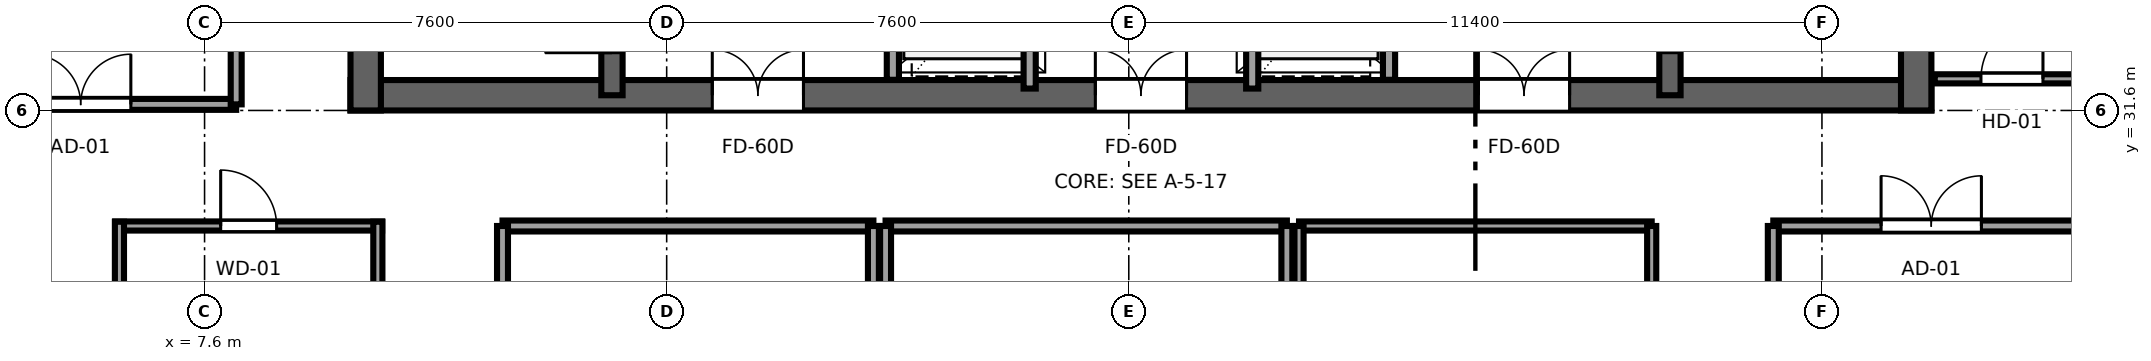
"""IFC4 building model, lengths in metres.
Left out: names, types, materials, properties, quantities, classifications, styles, units other than length and angle.
Written with IfcOpenShell. Run it as: python <this file> out.ifc"""

import sys

from ifc_helpers import new_model, si_unit, direction, frame, frame_2d, origin, place, context, subcontext, project, spatial, rectangle, extrude, source, transform, mapped, element, fill, save


model = new_model("IFC4")
c1 = context("Model", 3, precision=1e-05, world=origin(), true_north=direction((0.0, 1.0)))
c2 = subcontext(c1, "Body", "Model", "MODEL_VIEW")
j1 = project(units=[si_unit("LENGTHUNIT", "METRE"), si_unit("PLANEANGLEUNIT", "RADIAN")], contexts=[c1])
p1 = place(None, origin())
s1 = spatial("IfcSite", under=j1, at=p1, CompositionType="ELEMENT")
p2 = place(p1, origin())
s2 = spatial("IfcBuilding", under=s1, at=p2, CompositionType="ELEMENT")
p3 = place(p2, frame((0.0, 0.0, 252.3)))
s3 = spatial("IfcBuildingStorey", under=s2, at=p3, CompositionType="ELEMENT", Elevation=252.3)
p4 = place(p3, frame((10.0, 31.85, 0.0), z_axis=(0.0, 0.0, 1.0), x_axis=(1.0, 0.0, 0.0)))
e1 = element("IfcWall", 1, at=p4, inside=s3, PredefinedType="SHEAR", context=c2, shape_type="SweptSolid", body=[
    extrude(rectangle(XDim=26.0, YDim=0.5, at=frame_2d((13.0, 0.0))), origin(), (0.0, 0.0, 1.0), 3.55),
])
p5 = place(p4, frame((7.45, 0.0, 0.0), z_axis=(0.0, 0.0, 1.0), x_axis=(-1.0, 0.0, 0.0)))
e2 = element("IfcOpeningElement", 2, at=p5, cuts=e1, PredefinedType="OPENING", context=c2, shape_type="SweptSolid", body=[
    extrude(rectangle(XDim=1.5, YDim=2.04, at=frame_2d((0.75, 1.02))), frame((0.0, 0.26, 0.0), z_axis=(0.0, -1.0, 0.0), x_axis=(1.0, 0.0, 0.0)), (0.0, 0.0, 1.0), 0.52),
])
p6 = place(p4, frame((13.75, 0.0, 0.0), z_axis=(0.0, 0.0, 1.0), x_axis=(-1.0, 0.0, 0.0)))
e3 = element("IfcOpeningElement", 3, at=p6, cuts=e1, PredefinedType="OPENING", context=c2, shape_type="SweptSolid", body=[
    extrude(rectangle(XDim=1.5, YDim=2.04, at=frame_2d((0.75, 1.02))), frame((0.0, 0.26, 0.0), z_axis=(0.0, -1.0, 0.0), x_axis=(1.0, 0.0, 0.0)), (0.0, 0.0, 1.0), 0.52),
])
p7 = place(p4, frame((20.05, 0.0, 0.0), z_axis=(0.0, 0.0, 1.0), x_axis=(-1.0, 0.0, 0.0)))
e4 = element("IfcOpeningElement", 4, at=p7, cuts=e1, PredefinedType="OPENING", context=c2, shape_type="SweptSolid", body=[
    extrude(rectangle(XDim=1.5, YDim=2.04, at=frame_2d((0.75, 1.02))), frame((0.0, 0.26, 0.0), z_axis=(0.0, -1.0, 0.0), x_axis=(1.0, 0.0, 0.0)), (0.0, 0.0, 1.0), 0.52),
])
for number, where, z_axis, x_axis in (
    (5, (10.25, 31.6, 0.0), (0.0, 0.0, 1.0), (0.0, 1.0, 0.0)),
    (6, (35.75, 31.6, 0.0), (0.0, 0.0, 1.0), (0.0, 1.0, 0.0)),
):
    element("IfcWall", number, at=place(p3, frame(where, z_axis=z_axis, x_axis=x_axis)), inside=s3, PredefinedType="SHEAR", context=c2, shape_type="SweptSolid", body=[
        extrude(rectangle(XDim=13.6, YDim=0.5, at=frame_2d((6.8, 0.0))), origin(), (0.0, 0.0, 1.0), 3.55),
    ])
p8 = place(p3, frame((14.3, 31.85, 0.0), z_axis=(0.0, 0.0, 1.0), x_axis=(0.0, 1.0, 0.0)))
e7 = element("IfcWall", 7, at=p8, inside=s3, PredefinedType="SHEAR", context=c2, shape_type="SweptSolid", body=[
    extrude(rectangle(XDim=13.1, YDim=0.35, at=frame_2d((6.55, 0.0))), origin(), (0.0, 0.0, 1.0), 3.55),
])
p9 = place(p8, frame((0.7, 0.0, 0.0)))
e8 = element("IfcOpeningElement", 8, at=p9, cuts=e7, PredefinedType="OPENING", context=c2, shape_type="SweptSolid", body=[
    extrude(rectangle(XDim=1.1, YDim=2.12, at=frame_2d((0.55, 1.06))), frame((0.0, 0.185, 0.0), z_axis=(0.0, -1.0, 0.0), x_axis=(1.0, 0.0, 0.0)), (0.0, 0.0, 1.0), 0.37),
])
p10 = place(p3, frame((31.7, 31.85, 0.0), z_axis=(0.0, 0.0, 1.0), x_axis=(0.0, 1.0, 0.0)))
e9 = element("IfcWall", 9, at=p10, inside=s3, PredefinedType="SHEAR", context=c2, shape_type="SweptSolid", body=[
    extrude(rectangle(XDim=13.1, YDim=0.35, at=frame_2d((6.55, 0.0))), origin(), (0.0, 0.0, 1.0), 3.55),
])
p11 = place(p10, frame((1.8, 0.0, 0.0), z_axis=(0.0, 0.0, 1.0), x_axis=(-1.0, 0.0, 0.0)))
e10 = element("IfcOpeningElement", 10, at=p11, cuts=e9, PredefinedType="OPENING", context=c2, shape_type="SweptSolid", body=[
    extrude(rectangle(XDim=1.1, YDim=2.12, at=frame_2d((0.55, 1.06))), frame((0.0, 0.185, 0.0), z_axis=(0.0, -1.0, 0.0), x_axis=(1.0, 0.0, 0.0)), (0.0, 0.0, 1.0), 0.37),
])
for number, where, z_axis, x_axis in (
    (11, (18.92, 32.104, 0.0), (0.0, 0.0, 1.0), (0.0, 1.0, 0.0)),
    (12, (27.08, 32.104, 0.0), (0.0, 0.0, 1.0), (0.0, 1.0, 0.0)),
):
    element("IfcWall", number, at=place(p3, frame(where, z_axis=z_axis, x_axis=x_axis)), inside=s3, PredefinedType="SOLIDWALL", context=c2, shape_type="SweptSolid", body=[
        extrude(rectangle(XDim=4.046, YDim=0.2, at=frame_2d((2.023, 0.0))), origin(), (0.0, 0.0, 1.0), 3.37),
    ])
p12 = place(p3, frame((21.17, 31.96, 0.0), z_axis=(0.0, 0.0, 1.0), x_axis=(0.0, 1.0, 0.0)))
e13 = element("IfcWall", 13, at=p12, inside=s3, PredefinedType="SOLIDWALL", context=c2, shape_type="SweptSolid", body=[
    extrude(rectangle(XDim=5.08, YDim=0.2, at=frame_2d((2.54, 0.0))), origin(), (0.0, 0.0, 1.0), 3.37),
])
p13 = place(p12, frame((0.74, 0.0, 0.0)))
e14 = element("IfcOpeningElement", 14, at=p13, cuts=e13, PredefinedType="OPENING", context=c2, shape_type="SweptSolid", body=[
    extrude(rectangle(XDim=1.1, YDim=2.12, at=frame_2d((0.55, 1.06))), frame((0.0, 0.11, 0.0), z_axis=(0.0, -1.0, 0.0), x_axis=(1.0, 0.0, 0.0)), (0.0, 0.0, 1.0), 0.22),
])
p14 = place(p12, frame((3.24, 0.0, 0.0)))
e15 = element("IfcOpeningElement", 15, at=p14, cuts=e13, PredefinedType="OPENING", context=c2, shape_type="SweptSolid", body=[
    extrude(rectangle(XDim=1.1, YDim=2.12, at=frame_2d((0.55, 1.06))), frame((0.0, 0.11, 0.0), z_axis=(0.0, -1.0, 0.0), x_axis=(1.0, 0.0, 0.0)), (0.0, 0.0, 1.0), 0.22),
])
p15 = place(p3, frame((24.83, 31.96, 0.0), z_axis=(0.0, 0.0, 1.0), x_axis=(0.0, 1.0, 0.0)))
e16 = element("IfcWall", 16, at=p15, inside=s3, PredefinedType="SOLIDWALL", context=c2, shape_type="SweptSolid", body=[
    extrude(rectangle(XDim=5.08, YDim=0.2, at=frame_2d((2.54, 0.0))), origin(), (0.0, 0.0, 1.0), 3.37),
])
p16 = place(p15, frame((0.74, 0.0, 0.0)))
e17 = element("IfcOpeningElement", 17, at=p16, cuts=e16, PredefinedType="OPENING", context=c2, shape_type="SweptSolid", body=[
    extrude(rectangle(XDim=1.1, YDim=2.12, at=frame_2d((0.55, 1.06))), frame((0.0, 0.11, 0.0), z_axis=(0.0, -1.0, 0.0), x_axis=(1.0, 0.0, 0.0)), (0.0, 0.0, 1.0), 0.22),
])
p17 = place(p15, frame((3.24, 0.0, 0.0)))
e18 = element("IfcOpeningElement", 18, at=p17, cuts=e16, PredefinedType="OPENING", context=c2, shape_type="SweptSolid", body=[
    extrude(rectangle(XDim=1.1, YDim=2.12, at=frame_2d((0.55, 1.06))), frame((0.0, 0.11, 0.0), z_axis=(0.0, -1.0, 0.0), x_axis=(1.0, 0.0, 0.0)), (0.0, 0.0, 1.0), 0.22),
])
p18 = place(p3, frame((12.5, 29.7, 0.0), z_axis=(0.0, 0.0, 1.0), x_axis=(1.0, 0.0, 0.0)))
e19 = element("IfcWall", 19, at=p18, inside=s3, PredefinedType="PARTITIONING", context=c2, shape_type="SweptSolid", body=[
    extrude(rectangle(XDim=6.1, YDim=0.18, at=frame_2d((3.05, 0.0))), origin(), (0.0, 0.0, 1.0), 3.37),
])
for number, where, z_axis, x_axis in (
    (20, (12.5, 22.5, 0.0), (0.0, 0.0, 1.0), (0.0, 1.0, 0.0)),
    (21, (18.6, 22.5, 0.0), (0.0, 0.0, 1.0), (0.0, 1.0, 0.0)),
):
    element("IfcWall", number, at=place(p3, frame(where, z_axis=z_axis, x_axis=x_axis)), inside=s3, PredefinedType="PARTITIONING", context=c2, shape_type="SweptSolid", body=[
        extrude(rectangle(XDim=7.2, YDim=0.18, at=frame_2d((3.6, 0.0))), origin(), (0.0, 0.0, 1.0), 3.37),
    ])
p19 = place(p3, frame((18.8, 29.7, 0.0), z_axis=(0.0, 0.0, 1.0), x_axis=(1.0, 0.0, 0.0)))
e22 = element("IfcWall", 22, at=p19, inside=s3, PredefinedType="PARTITIONING", context=c2, shape_type="SweptSolid", body=[
    extrude(rectangle(XDim=6.6, YDim=0.18, at=frame_2d((3.3, 0.0))), origin(), (0.0, 0.0, 1.0), 3.37),
])
for number, where, z_axis, x_axis in (
    (23, (18.8, 22.5, 0.0), (0.0, 0.0, 1.0), (0.0, 1.0, 0.0)),
    (24, (25.4, 22.5, 0.0), (0.0, 0.0, 1.0), (0.0, 1.0, 0.0)),
):
    element("IfcWall", number, at=place(p3, frame(where, z_axis=z_axis, x_axis=x_axis)), inside=s3, PredefinedType="PARTITIONING", context=c2, shape_type="SweptSolid", body=[
        extrude(rectangle(XDim=7.2, YDim=0.18, at=frame_2d((3.6, 0.0))), origin(), (0.0, 0.0, 1.0), 3.37),
    ])
p20 = place(p3, frame((25.6, 29.7, 0.0), z_axis=(0.0, 0.0, 1.0), x_axis=(1.0, 0.0, 0.0)))
e25 = element("IfcWall", 25, at=p20, inside=s3, PredefinedType="PARTITIONING", context=c2, shape_type="SweptSolid", body=[
    extrude(rectangle(XDim=5.8, YDim=0.15, at=frame_2d((2.9, 0.0))), origin(), (0.0, 0.0, 1.0), 3.37),
])
for number, where, z_axis, x_axis in (
    (26, (25.6, 22.5, 0.0), (0.0, 0.0, 1.0), (0.0, 1.0, 0.0)),
    (27, (31.4, 22.5, 0.0), (0.0, 0.0, 1.0), (0.0, 1.0, 0.0)),
):
    element("IfcWall", number, at=place(p3, frame(where, z_axis=z_axis, x_axis=x_axis)), inside=s3, PredefinedType="PARTITIONING", context=c2, shape_type="SweptSolid", body=[
        extrude(rectangle(XDim=7.2, YDim=0.15, at=frame_2d((3.6, 0.0))), origin(), (0.0, 0.0, 1.0), 3.37),
    ])
p21 = place(p3, frame((6.13, 29.7, 0.0), z_axis=(0.0, 0.0, 1.0), x_axis=(1.0, 0.0, 0.0)))
e28 = element("IfcWall", 28, at=p21, inside=s3, PredefinedType="PARTITIONING", context=c2, shape_type="SweptSolid", body=[
    extrude(rectangle(XDim=4.39, YDim=0.15, at=frame_2d((2.195, 0.0))), origin(), (0.0, 0.0, 1.0), 3.37),
])
p22 = place(p21, frame((1.735, 0.0, 0.0)))
e29 = element("IfcOpeningElement", 29, at=p22, cuts=e28, PredefinedType="OPENING", context=c2, shape_type="SweptSolid", body=[
    extrude(rectangle(XDim=0.92, YDim=2.01, at=frame_2d((0.46, 1.005))), frame((0.0, 0.085, 0.0), z_axis=(0.0, -1.0, 0.0), x_axis=(1.0, 0.0, 0.0)), (0.0, 0.0, 1.0), 0.17),
])
for number, where, z_axis, x_axis in (
    (30, (6.2, 26.43, 0.0), (0.0, 0.0, 1.0), (0.0, 1.0, 0.0)),
    (31, (10.45, 26.43, 0.0), (0.0, 0.0, 1.0), (0.0, 1.0, 0.0)),
):
    element("IfcWall", number, at=place(p3, frame(where, z_axis=z_axis, x_axis=x_axis)), inside=s3, PredefinedType="PARTITIONING", context=c2, shape_type="SweptSolid", body=[
        extrude(rectangle(XDim=3.34, YDim=0.15, at=frame_2d((1.67, 0.0))), origin(), (0.0, 0.0, 1.0), 3.37),
    ])
p23 = place(p3, frame((3.005, 31.7, 0.0), z_axis=(0.0, 0.0, 1.0), x_axis=(1.0, 0.0, 0.0)))
e32 = element("IfcWall", 32, at=p23, inside=s3, PredefinedType="PARTITIONING", context=c2, shape_type="SweptSolid", body=[
    extrude(rectangle(XDim=5.115, YDim=0.18, at=frame_2d((2.558, 0.0))), origin(), (0.0, 0.0, 1.0), 3.37),
])
p24 = place(p23, frame((1.732, 0.0, 0.0)))
e33 = element("IfcOpeningElement", 33, at=p24, cuts=e32, PredefinedType="OPENING", context=c2, shape_type="SweptSolid", body=[
    extrude(rectangle(XDim=1.65, YDim=2.15, at=frame_2d((0.825, 1.075))), frame((0.0, 0.1, 0.0), z_axis=(0.0, -1.0, 0.0), x_axis=(1.0, 0.0, 0.0)), (0.0, 0.0, 1.0), 0.2),
])
p25 = place(p3, frame((8.12, 31.7, 0.0), z_axis=(0.0, 0.0, 1.0), x_axis=(0.0, 1.0, 0.0)))
e34 = element("IfcWall", 34, at=p25, inside=s3, PredefinedType="PARTITIONING", context=c2, shape_type="SweptSolid", body=[
    extrude(rectangle(XDim=6.1, YDim=0.18, at=frame_2d((3.05, 0.0))), origin(), (0.0, 0.0, 1.0), 3.37),
])
p26 = place(p3, frame((36.055, 32.12, 0.0), z_axis=(0.0, 0.0, 1.0), x_axis=(1.0, 0.0, 0.0)))
e35 = element("IfcWall", 35, at=p26, inside=s3, PredefinedType="PARTITIONING", context=c2, shape_type="SweptSolid", body=[
    extrude(rectangle(XDim=2.54, YDim=0.15, at=frame_2d((1.27, 0.0))), origin(), (0.0, 0.0, 1.0), 3.37),
])
p27 = place(p26, frame((0.76, 0.0, 0.0)))
e36 = element("IfcOpeningElement", 36, at=p27, cuts=e35, PredefinedType="OPENING", context=c2, shape_type="SweptSolid", body=[
    extrude(rectangle(XDim=1.02, YDim=2.03, at=frame_2d((0.51, 1.015))), frame((0.0, 0.085, 0.0), z_axis=(0.0, -1.0, 0.0), x_axis=(1.0, 0.0, 0.0)), (0.0, 0.0, 1.0), 0.17),
])
p28 = place(p3, frame((33.4, 29.7, 0.0), z_axis=(0.0, 0.0, 1.0), x_axis=(1.0, 0.0, 0.0)))
e37 = element("IfcWall", 37, at=p28, inside=s3, PredefinedType="PARTITIONING", context=c2, shape_type="SweptSolid", body=[
    extrude(rectangle(XDim=5.195, YDim=0.18, at=frame_2d((2.598, 0.0))), origin(), (0.0, 0.0, 1.0), 3.37),
])
p29 = place(p28, frame((1.772, 0.0, 0.0)))
e38 = element("IfcOpeningElement", 38, at=p29, cuts=e37, PredefinedType="OPENING", context=c2, shape_type="SweptSolid", body=[
    extrude(rectangle(XDim=1.65, YDim=2.15, at=frame_2d((0.825, 1.075))), frame((0.0, 0.1, 0.0), z_axis=(0.0, -1.0, 0.0), x_axis=(1.0, 0.0, 0.0)), (0.0, 0.0, 1.0), 0.2),
])
p30 = place(p3, frame((33.4, 21.9, 0.0), z_axis=(0.0, 0.0, 1.0), x_axis=(0.0, 1.0, 0.0)))
e39 = element("IfcWall", 39, at=p30, inside=s3, PredefinedType="PARTITIONING", context=c2, shape_type="SweptSolid", body=[
    extrude(rectangle(XDim=7.8, YDim=0.18, at=frame_2d((3.9, 0.0))), origin(), (0.0, 0.0, 1.0), 3.37),
])
m1 = source(origin(), c2, "Body", "SweptSolid", [
    extrude(rectangle(XDim=1.1, YDim=2.12, at=frame_2d((0.55, 1.06))), frame((0.0, 0.025, 0.0), z_axis=(0.0, -1.0, 0.0), x_axis=(1.0, 0.0, 0.0)), (0.0, 0.0, 1.0), 0.05),
])
p31 = place(p9, origin())
e40 = element("IfcDoor", 40, at=p31, inside=s3, OperationType="SINGLE_SWING_LEFT", PredefinedType="DOOR", context=c2, shape_type="MappedRepresentation", body=[
    mapped(m1, transform((0.0, 0.0, 0.0), x_axis=(1.0, 0.0, 0.0), y_axis=(0.0, 1.0, 0.0), z_axis=(0.0, 0.0, 1.0), scale=1.0)),
])
fill(e8, e40)
p32 = place(p11, origin())
e41 = element("IfcDoor", 41, at=p32, inside=s3, OperationType="SINGLE_SWING_RIGHT", PredefinedType="DOOR", context=c2, shape_type="MappedRepresentation", body=[
    mapped(m1, transform((0.0, 0.0, 0.0), x_axis=(1.0, 0.0, 0.0), y_axis=(0.0, 1.0, 0.0), z_axis=(0.0, 0.0, 1.0), scale=1.0)),
])
fill(e10, e41)
m2 = source(origin(), c2, "Body", "SweptSolid", [
    extrude(rectangle(XDim=1.5, YDim=2.04, at=frame_2d((0.75, 1.02))), frame((0.0, 0.025, 0.0), z_axis=(0.0, -1.0, 0.0), x_axis=(1.0, 0.0, 0.0)), (0.0, 0.0, 1.0), 0.05),
])
p33 = place(p5, origin())
e42 = element("IfcDoor", 42, at=p33, inside=s3, OperationType="DOUBLE_DOOR_SINGLE_SWING", PredefinedType="DOOR", context=c2, shape_type="MappedRepresentation", body=[
    mapped(m2, transform((0.0, 0.0, 0.0), x_axis=(1.0, 0.0, 0.0), y_axis=(0.0, 1.0, 0.0), z_axis=(0.0, 0.0, 1.0), scale=1.0)),
])
fill(e2, e42)
p34 = place(p6, origin())
e43 = element("IfcDoor", 43, at=p34, inside=s3, OperationType="DOUBLE_DOOR_SINGLE_SWING", PredefinedType="DOOR", context=c2, shape_type="MappedRepresentation", body=[
    mapped(m2, transform((0.0, 0.0, 0.0), x_axis=(1.0, 0.0, 0.0), y_axis=(0.0, 1.0, 0.0), z_axis=(0.0, 0.0, 1.0), scale=1.0)),
])
fill(e3, e43)
p35 = place(p7, origin())
e44 = element("IfcDoor", 44, at=p35, inside=s3, OperationType="DOUBLE_DOOR_SINGLE_SWING", PredefinedType="DOOR", context=c2, shape_type="MappedRepresentation", body=[
    mapped(m2, transform((0.0, 0.0, 0.0), x_axis=(1.0, 0.0, 0.0), y_axis=(0.0, 1.0, 0.0), z_axis=(0.0, 0.0, 1.0), scale=1.0)),
])
fill(e4, e44)
m3 = source(origin(), c2, "Body", "SweptSolid", [
    extrude(rectangle(XDim=0.92, YDim=2.01, at=frame_2d((0.46, 1.005))), frame((0.0, 0.025, 0.0), z_axis=(0.0, -1.0, 0.0), x_axis=(1.0, 0.0, 0.0)), (0.0, 0.0, 1.0), 0.05),
])
p36 = place(p22, origin())
e45 = element("IfcDoor", 45, at=p36, inside=s3, OperationType="SINGLE_SWING_LEFT", PredefinedType="DOOR", context=c2, shape_type="MappedRepresentation", body=[
    mapped(m3, transform((0.0, 0.0, 0.0), x_axis=(1.0, 0.0, 0.0), y_axis=(0.0, 1.0, 0.0), z_axis=(0.0, 0.0, 1.0), scale=1.0)),
])
fill(e29, e45)
m4 = source(origin(), c2, "Body", "SweptSolid", [
    extrude(rectangle(XDim=1.65, YDim=2.15, at=frame_2d((0.825, 1.075))), frame((0.0, 0.025, 0.0), z_axis=(0.0, -1.0, 0.0), x_axis=(1.0, 0.0, 0.0)), (0.0, 0.0, 1.0), 0.05),
])
p37 = place(p24, origin())
e46 = element("IfcDoor", 46, at=p37, inside=s3, OperationType="DOUBLE_DOOR_SINGLE_SWING", PredefinedType="DOOR", context=c2, shape_type="MappedRepresentation", body=[
    mapped(m4, transform((0.0, 0.0, 0.0), x_axis=(1.0, 0.0, 0.0), y_axis=(0.0, 1.0, 0.0), z_axis=(0.0, 0.0, 1.0), scale=1.0)),
])
fill(e33, e46)
m5 = source(origin(), c2, "Body", "SweptSolid", [
    extrude(rectangle(XDim=1.02, YDim=2.03, at=frame_2d((0.51, 1.015))), frame((0.0, 0.025, 0.0), z_axis=(0.0, -1.0, 0.0), x_axis=(1.0, 0.0, 0.0)), (0.0, 0.0, 1.0), 0.05),
])
p38 = place(p27, origin())
e47 = element("IfcDoor", 47, at=p38, inside=s3, OperationType="SINGLE_SWING_RIGHT", PredefinedType="DOOR", context=c2, shape_type="MappedRepresentation", body=[
    mapped(m5, transform((0.0, 0.0, 0.0), x_axis=(1.0, 0.0, 0.0), y_axis=(0.0, 1.0, 0.0), z_axis=(0.0, 0.0, 1.0), scale=1.0)),
])
fill(e36, e47)
p39 = place(p29, origin())
e48 = element("IfcDoor", 48, at=p39, inside=s3, OperationType="DOUBLE_DOOR_SINGLE_SWING", PredefinedType="DOOR", context=c2, shape_type="MappedRepresentation", body=[
    mapped(m4, transform((0.0, 0.0, 0.0), x_axis=(1.0, 0.0, 0.0), y_axis=(0.0, 1.0, 0.0), z_axis=(0.0, 0.0, 1.0), scale=1.0)),
])
fill(e38, e48)
save(model, sys.argv[1])
